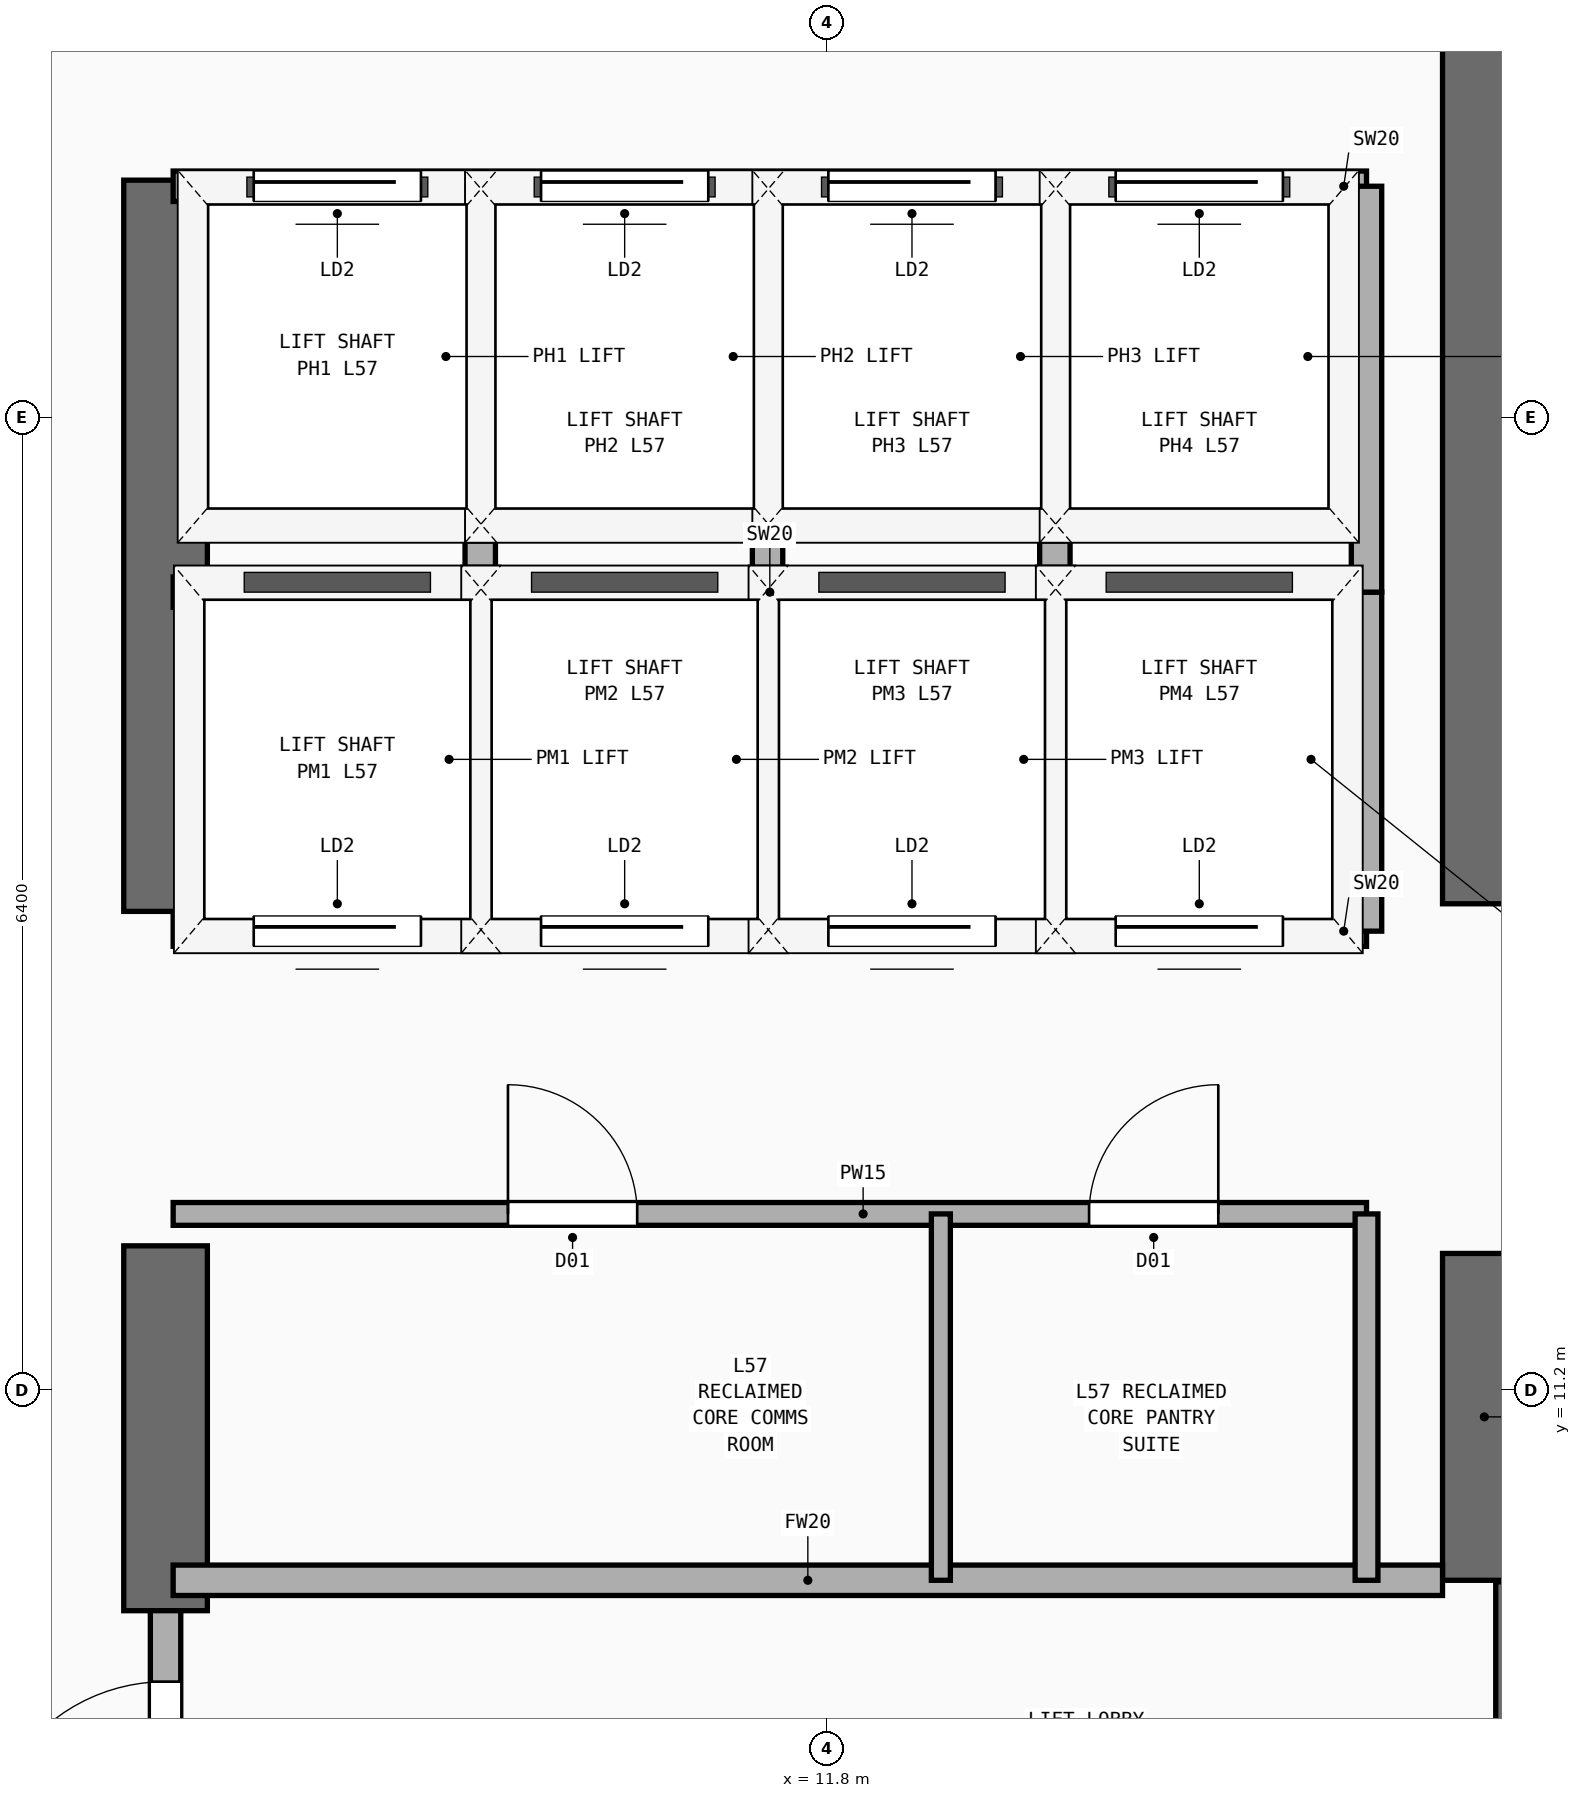
"""IFC4 building model, lengths in metres.
Left out: names, types, materials, properties, quantities, classifications, styles, units other than length and angle.
Written with IfcOpenShell. Run it as: python <this file> out.ifc"""

import sys

from ifc_helpers import new_model, si_unit, direction, frame, frame_2d, origin, place, context, subcontext, project, spatial, rectangle, extrude, element, fill, save


model = new_model("IFC4")
c1 = context("Model", 3, precision=1e-05, world=origin(), true_north=direction((0.0, 1.0)))
c2 = subcontext(c1, "Body", "Model", "MODEL_VIEW")
j1 = project(units=[si_unit("LENGTHUNIT", "METRE"), si_unit("PLANEANGLEUNIT", "RADIAN")], contexts=[c1])
p1 = place(None, origin())
s1 = spatial("IfcSite", under=j1, at=p1, CompositionType="ELEMENT")
p2 = place(p1, origin())
s2 = spatial("IfcBuilding", under=s1, at=p2, CompositionType="ELEMENT")
p3 = place(p2, frame((0.0, 0.0, 223.5)))
s3 = spatial("IfcBuildingStorey", under=s2, at=p3, CompositionType="ELEMENT", Elevation=223.5)
p4 = place(p3, frame((7.45, 9.75, 0.0), z_axis=(0.0, 0.0, 1.0), x_axis=(0.0, 1.0, 0.0)))
e1 = element("IfcWall", 1, at=p4, inside=s3, PredefinedType="SHEAR", context=c2, shape_type="SweptSolid", body=[
    extrude(rectangle(XDim=2.4, YDim=0.55, at=frame_2d((1.2, 0.0))), origin(), (0.0, 0.0, 1.0), 3.56),
])
p5 = place(p3, frame((7.45, 14.35, 0.0), z_axis=(0.0, 0.0, 1.0), x_axis=(0.0, 1.0, 0.0)))
e2 = element("IfcWall", 2, at=p5, inside=s3, PredefinedType="SHEAR", context=c2, shape_type="SweptSolid", body=[
    extrude(rectangle(XDim=4.81, YDim=0.55, at=frame_2d((2.405, 0.0))), origin(), (0.0, 0.0, 1.0), 3.56),
])
p6 = place(p3, frame((16.125, 9.95, 0.0), z_axis=(0.0, 0.0, 1.0), x_axis=(0.0, 1.0, 0.0)))
e3 = element("IfcWall", 3, at=p6, inside=s3, PredefinedType="SHEAR", context=c2, shape_type="SweptSolid", body=[
    extrude(rectangle(XDim=2.15, YDim=0.55, at=frame_2d((1.075, 0.0))), origin(), (0.0, 0.0, 1.0), 3.56),
])
p7 = place(p3, frame((16.125, 14.4, 0.0), z_axis=(0.0, 0.0, 1.0), x_axis=(0.0, 1.0, 0.0)))
e4 = element("IfcWall", 4, at=p7, inside=s3, PredefinedType="SHEAR", context=c2, shape_type="SweptSolid", body=[
    extrude(rectangle(XDim=9.1, YDim=0.55, at=frame_2d((4.55, 0.0))), origin(), (0.0, 0.0, 1.0), 3.56),
])
p8 = place(p3, frame((16.3, 7.36, 0.0), z_axis=(0.0, 0.0, 1.0), x_axis=(0.0, 1.0, 0.0)))
e5 = element("IfcWall", 5, at=p8, inside=s3, PredefinedType="SHEAR", context=c2, shape_type="SweptSolid", body=[
    extrude(rectangle(XDim=2.58, YDim=0.2, at=frame_2d((1.29, 0.0))), origin(), (0.0, 0.0, 1.0), 3.56),
])
p9 = place(p3, frame((7.5, 9.95, 0.0), z_axis=(0.0, 0.0, 1.0), x_axis=(1.0, 0.0, 0.0)))
e6 = element("IfcWall", 6, at=p9, inside=s3, PredefinedType="PARTITIONING", context=c2, shape_type="SweptSolid", body=[
    extrude(rectangle(XDim=8.35, YDim=0.2, at=frame_2d((4.175, 0.0))), origin(), (0.0, 0.0, 1.0), 3.56),
])
p10 = place(p3, frame((7.45, 7.45, 0.0), z_axis=(0.0, 0.0, 1.0), x_axis=(0.0, 1.0, 0.0)))
e7 = element("IfcWall", 7, at=p10, inside=s3, PredefinedType="PARTITIONING", context=c2, shape_type="SweptSolid", body=[
    extrude(rectangle(XDim=2.3, YDim=0.2, at=frame_2d((1.15, 0.0))), origin(), (0.0, 0.0, 1.0), 2.54),
])
p11 = place(p10, frame((0.633, 0.0, 0.0)))
e8 = element("IfcOpeningElement", 8, at=p11, cuts=e7, PredefinedType="OPENING", context=c2, shape_type="SweptSolid", body=[
    extrude(rectangle(XDim=1.2, YDim=2.25, at=frame_2d((0.6, 1.125))), frame((0.0, 0.11, 0.0), z_axis=(0.0, -1.0, 0.0), x_axis=(1.0, 0.0, 0.0)), (0.0, 0.0, 1.0), 0.22),
])
p12 = place(p3, frame((7.5, 12.36, 0.0), z_axis=(0.0, 0.0, 1.0), x_axis=(1.0, 0.0, 0.0)))
e9 = element("IfcWall", 9, at=p12, inside=s3, PredefinedType="PARTITIONING", context=c2, shape_type="SweptSolid", body=[
    extrude(rectangle(XDim=7.85, YDim=0.15, at=frame_2d((3.925, 0.0))), origin(), (0.0, 0.0, 1.0), 3.56),
])
p13 = place(p12, frame((2.202, 0.0, 0.0)))
e10 = element("IfcOpeningElement", 10, at=p13, cuts=e9, PredefinedType="OPENING", context=c2, shape_type="SweptSolid", body=[
    extrude(rectangle(XDim=0.85, YDim=2.15, at=frame_2d((0.425, 1.075))), frame((0.0, 0.085, 0.0), z_axis=(0.0, -1.0, 0.0), x_axis=(1.0, 0.0, 0.0)), (0.0, 0.0, 1.0), 0.17),
])
p14 = place(p12, frame((6.025, 0.0, 0.0)))
e11 = element("IfcOpeningElement", 11, at=p14, cuts=e9, PredefinedType="OPENING", context=c2, shape_type="SweptSolid", body=[
    extrude(rectangle(XDim=0.85, YDim=2.15, at=frame_2d((0.425, 1.075))), frame((0.0, 0.085, 0.0), z_axis=(0.0, -1.0, 0.0), x_axis=(1.0, 0.0, 0.0)), (0.0, 0.0, 1.0), 0.17),
])
p15 = place(p3, frame((15.35, 9.95, 0.0), z_axis=(0.0, 0.0, 1.0), x_axis=(0.0, 1.0, 0.0)))
e12 = element("IfcWall", 12, at=p15, inside=s3, PredefinedType="PARTITIONING", context=c2, shape_type="SweptSolid", body=[
    extrude(rectangle(XDim=2.41, YDim=0.15, at=frame_2d((1.205, 0.0))), origin(), (0.0, 0.0, 1.0), 3.56),
])
p16 = place(p3, frame((12.55, 9.95, 0.0), z_axis=(0.0, 0.0, 1.0), x_axis=(0.0, 1.0, 0.0)))
e13 = element("IfcWall", 13, at=p16, inside=s3, PredefinedType="PARTITIONING", context=c2, shape_type="SweptSolid", body=[
    extrude(rectangle(XDim=2.41, YDim=0.125, at=frame_2d((1.205, 0.0))), origin(), (0.0, 0.0, 1.0), 3.56),
])
p17 = place(p3, frame((7.5, 14.22, 0.0), z_axis=(0.0, 0.0, 1.0), x_axis=(1.0, 0.0, 0.0)))
e14 = element("IfcWall", 14, at=p17, inside=s3, PredefinedType="PARTITIONING", context=c2, shape_type="SweptSolid", body=[
    extrude(rectangle(XDim=7.85, YDim=0.2, at=frame_2d((3.925, 0.0))), origin(), (0.0, 0.0, 1.0), 3.56),
])
p18 = place(p17, frame((0.53, 0.0, 0.0)))
e15 = element("IfcOpeningElement", 15, at=p18, cuts=e14, PredefinedType="OPENING", context=c2, shape_type="SweptSolid", body=[
    extrude(rectangle(XDim=1.1, YDim=2.2, at=frame_2d((0.55, 1.1))), frame((0.0, 0.11, 0.0), z_axis=(0.0, -1.0, 0.0), x_axis=(1.0, 0.0, 0.0)), (0.0, 0.0, 1.0), 0.22),
])
p19 = place(p17, frame((2.42, 0.0, 0.0)))
e16 = element("IfcOpeningElement", 16, at=p19, cuts=e14, PredefinedType="OPENING", context=c2, shape_type="SweptSolid", body=[
    extrude(rectangle(XDim=1.1, YDim=2.2, at=frame_2d((0.55, 1.1))), frame((0.0, 0.11, 0.0), z_axis=(0.0, -1.0, 0.0), x_axis=(1.0, 0.0, 0.0)), (0.0, 0.0, 1.0), 0.22),
])
p20 = place(p17, frame((4.31, 0.0, 0.0)))
e17 = element("IfcOpeningElement", 17, at=p20, cuts=e14, PredefinedType="OPENING", context=c2, shape_type="SweptSolid", body=[
    extrude(rectangle(XDim=1.1, YDim=2.2, at=frame_2d((0.55, 1.1))), frame((0.0, 0.11, 0.0), z_axis=(0.0, -1.0, 0.0), x_axis=(1.0, 0.0, 0.0)), (0.0, 0.0, 1.0), 0.22),
])
p21 = place(p17, frame((6.2, 0.0, 0.0)))
e18 = element("IfcOpeningElement", 18, at=p21, cuts=e14, PredefinedType="OPENING", context=c2, shape_type="SweptSolid", body=[
    extrude(rectangle(XDim=1.1, YDim=2.2, at=frame_2d((0.55, 1.1))), frame((0.0, 0.11, 0.0), z_axis=(0.0, -1.0, 0.0), x_axis=(1.0, 0.0, 0.0)), (0.0, 0.0, 1.0), 0.22),
])
p22 = place(p3, frame((7.5, 16.45, 0.0), z_axis=(0.0, 0.0, 1.0), x_axis=(1.0, 0.0, 0.0)))
e19 = element("IfcWall", 19, at=p22, inside=s3, PredefinedType="PARTITIONING", context=c2, shape_type="SweptSolid", body=[
    extrude(rectangle(XDim=7.85, YDim=0.2, at=frame_2d((3.925, 0.0))), origin(), (0.0, 0.0, 1.0), 3.56),
])
for number, where, z_axis, x_axis in (
    (20, (15.35, 14.22, 0.0), (0.0, 0.0, 1.0), (0.0, 1.0, 0.0)),
    (21, (9.52, 14.22, 0.0), (0.0, 0.0, 1.0), (0.0, 1.0, 0.0)),
    (22, (11.41, 14.22, 0.0), (0.0, 0.0, 1.0), (0.0, 1.0, 0.0)),
    (23, (13.3, 14.22, 0.0), (0.0, 0.0, 1.0), (0.0, 1.0, 0.0)),
):
    element("IfcWall", number, at=place(p3, frame(where, z_axis=z_axis, x_axis=x_axis)), inside=s3, PredefinedType="PARTITIONING", context=c2, shape_type="SweptSolid", body=[
        extrude(rectangle(XDim=2.23, YDim=0.2, at=frame_2d((1.115, 0.0))), origin(), (0.0, 0.0, 1.0), 3.56),
    ])
p23 = place(p3, frame((7.5, 19.12, 0.0), z_axis=(0.0, 0.0, 1.0), x_axis=(1.0, 0.0, 0.0)))
e24 = element("IfcWall", 24, at=p23, inside=s3, PredefinedType="PARTITIONING", context=c2, shape_type="SweptSolid", body=[
    extrude(rectangle(XDim=7.85, YDim=0.2, at=frame_2d((3.925, 0.0))), origin(), (0.0, 0.0, 1.0), 3.56),
])
p24 = place(p23, frame((0.53, 0.0, 0.0)))
e25 = element("IfcOpeningElement", 25, at=p24, cuts=e24, PredefinedType="OPENING", context=c2, shape_type="SweptSolid", body=[
    extrude(rectangle(XDim=1.1, YDim=2.2, at=frame_2d((0.55, 1.1))), frame((0.0, 0.11, 0.0), z_axis=(0.0, -1.0, 0.0), x_axis=(1.0, 0.0, 0.0)), (0.0, 0.0, 1.0), 0.22),
])
p25 = place(p23, frame((2.42, 0.0, 0.0)))
e26 = element("IfcOpeningElement", 26, at=p25, cuts=e24, PredefinedType="OPENING", context=c2, shape_type="SweptSolid", body=[
    extrude(rectangle(XDim=1.1, YDim=2.2, at=frame_2d((0.55, 1.1))), frame((0.0, 0.11, 0.0), z_axis=(0.0, -1.0, 0.0), x_axis=(1.0, 0.0, 0.0)), (0.0, 0.0, 1.0), 0.22),
])
p26 = place(p23, frame((4.31, 0.0, 0.0)))
e27 = element("IfcOpeningElement", 27, at=p26, cuts=e24, PredefinedType="OPENING", context=c2, shape_type="SweptSolid", body=[
    extrude(rectangle(XDim=1.1, YDim=2.2, at=frame_2d((0.55, 1.1))), frame((0.0, 0.11, 0.0), z_axis=(0.0, -1.0, 0.0), x_axis=(1.0, 0.0, 0.0)), (0.0, 0.0, 1.0), 0.22),
])
p27 = place(p23, frame((6.2, 0.0, 0.0)))
e28 = element("IfcOpeningElement", 28, at=p27, cuts=e24, PredefinedType="OPENING", context=c2, shape_type="SweptSolid", body=[
    extrude(rectangle(XDim=1.1, YDim=2.2, at=frame_2d((0.55, 1.1))), frame((0.0, 0.11, 0.0), z_axis=(0.0, -1.0, 0.0), x_axis=(1.0, 0.0, 0.0)), (0.0, 0.0, 1.0), 0.22),
])
for number, where, z_axis, x_axis in (
    (29, (15.35, 16.45, 0.0), (0.0, 0.0, 1.0), (0.0, 1.0, 0.0)),
    (30, (9.52, 16.45, 0.0), (0.0, 0.0, 1.0), (0.0, 1.0, 0.0)),
    (31, (11.41, 16.45, 0.0), (0.0, 0.0, 1.0), (0.0, 1.0, 0.0)),
    (32, (13.3, 16.45, 0.0), (0.0, 0.0, 1.0), (0.0, 1.0, 0.0)),
):
    element("IfcWall", number, at=place(p3, frame(where, z_axis=z_axis, x_axis=x_axis)), inside=s3, PredefinedType="PARTITIONING", context=c2, shape_type="SweptSolid", body=[
        extrude(rectangle(XDim=2.67, YDim=0.2, at=frame_2d((1.335, 0.0))), origin(), (0.0, 0.0, 1.0), 3.56),
    ])
p28 = place(p11, frame((1.2, 0.0, 0.0), z_axis=(0.0, 0.0, 1.0), x_axis=(-1.0, 0.0, 0.0)))
e33 = element("IfcDoor", 33, at=p28, inside=s3, OperationType="SINGLE_SWING_RIGHT", PredefinedType="DOOR", context=c2, shape_type="SweptSolid", body=[
    extrude(rectangle(XDim=1.2, YDim=2.25, at=frame_2d((0.6, 1.125))), frame((0.0, 0.025, 0.0), z_axis=(0.0, -1.0, 0.0), x_axis=(1.0, 0.0, 0.0)), (0.0, 0.0, 1.0), 0.05),
])
fill(e8, e33)
p29 = place(p13, origin())
e34 = element("IfcDoor", 34, at=p29, inside=s3, OperationType="SINGLE_SWING_LEFT", PredefinedType="DOOR", context=c2, shape_type="SweptSolid", body=[
    extrude(rectangle(XDim=0.85, YDim=2.15, at=frame_2d((0.425, 1.075))), frame((0.0, 0.025, 0.0), z_axis=(0.0, -1.0, 0.0), x_axis=(1.0, 0.0, 0.0)), (0.0, 0.0, 1.0), 0.05),
])
fill(e10, e34)
p30 = place(p14, origin())
e35 = element("IfcDoor", 35, at=p30, inside=s3, OperationType="SINGLE_SWING_RIGHT", PredefinedType="DOOR", context=c2, shape_type="SweptSolid", body=[
    extrude(rectangle(XDim=0.85, YDim=2.15, at=frame_2d((0.425, 1.075))), frame((0.0, 0.025, 0.0), z_axis=(0.0, -1.0, 0.0), x_axis=(1.0, 0.0, 0.0)), (0.0, 0.0, 1.0), 0.05),
])
fill(e11, e35)
p31 = place(p18, frame((1.1, 0.0, 0.0), z_axis=(0.0, 0.0, 1.0), x_axis=(-1.0, 0.0, 0.0)))
e36 = element("IfcDoor", 36, at=p31, inside=s3, OperationType="SLIDING_TO_LEFT", PredefinedType="DOOR", context=c2, shape_type="SweptSolid", body=[
    extrude(rectangle(XDim=1.1, YDim=2.2, at=frame_2d((0.55, 1.1))), frame((0.0, 0.025, 0.0), z_axis=(0.0, -1.0, 0.0), x_axis=(1.0, 0.0, 0.0)), (0.0, 0.0, 1.0), 0.05),
])
fill(e15, e36)
p32 = place(p19, frame((1.1, 0.0, 0.0), z_axis=(0.0, 0.0, 1.0), x_axis=(-1.0, 0.0, 0.0)))
e37 = element("IfcDoor", 37, at=p32, inside=s3, OperationType="SLIDING_TO_LEFT", PredefinedType="DOOR", context=c2, shape_type="SweptSolid", body=[
    extrude(rectangle(XDim=1.1, YDim=2.2, at=frame_2d((0.55, 1.1))), frame((0.0, 0.025, 0.0), z_axis=(0.0, -1.0, 0.0), x_axis=(1.0, 0.0, 0.0)), (0.0, 0.0, 1.0), 0.05),
])
fill(e16, e37)
p33 = place(p20, frame((1.1, 0.0, 0.0), z_axis=(0.0, 0.0, 1.0), x_axis=(-1.0, 0.0, 0.0)))
e38 = element("IfcDoor", 38, at=p33, inside=s3, OperationType="SLIDING_TO_LEFT", PredefinedType="DOOR", context=c2, shape_type="SweptSolid", body=[
    extrude(rectangle(XDim=1.1, YDim=2.2, at=frame_2d((0.55, 1.1))), frame((0.0, 0.025, 0.0), z_axis=(0.0, -1.0, 0.0), x_axis=(1.0, 0.0, 0.0)), (0.0, 0.0, 1.0), 0.05),
])
fill(e17, e38)
p34 = place(p21, frame((1.1, 0.0, 0.0), z_axis=(0.0, 0.0, 1.0), x_axis=(-1.0, 0.0, 0.0)))
e39 = element("IfcDoor", 39, at=p34, inside=s3, OperationType="SLIDING_TO_LEFT", PredefinedType="DOOR", context=c2, shape_type="SweptSolid", body=[
    extrude(rectangle(XDim=1.1, YDim=2.2, at=frame_2d((0.55, 1.1))), frame((0.0, 0.025, 0.0), z_axis=(0.0, -1.0, 0.0), x_axis=(1.0, 0.0, 0.0)), (0.0, 0.0, 1.0), 0.05),
])
fill(e18, e39)
p35 = place(p24, origin())
e40 = element("IfcDoor", 40, at=p35, inside=s3, OperationType="SLIDING_TO_LEFT", PredefinedType="DOOR", context=c2, shape_type="SweptSolid", body=[
    extrude(rectangle(XDim=1.1, YDim=2.2, at=frame_2d((0.55, 1.1))), frame((0.0, 0.025, 0.0), z_axis=(0.0, -1.0, 0.0), x_axis=(1.0, 0.0, 0.0)), (0.0, 0.0, 1.0), 0.05),
])
fill(e25, e40)
p36 = place(p25, origin())
e41 = element("IfcDoor", 41, at=p36, inside=s3, OperationType="SLIDING_TO_LEFT", PredefinedType="DOOR", context=c2, shape_type="SweptSolid", body=[
    extrude(rectangle(XDim=1.1, YDim=2.2, at=frame_2d((0.55, 1.1))), frame((0.0, 0.025, 0.0), z_axis=(0.0, -1.0, 0.0), x_axis=(1.0, 0.0, 0.0)), (0.0, 0.0, 1.0), 0.05),
])
fill(e26, e41)
p37 = place(p26, origin())
e42 = element("IfcDoor", 42, at=p37, inside=s3, OperationType="SLIDING_TO_LEFT", PredefinedType="DOOR", context=c2, shape_type="SweptSolid", body=[
    extrude(rectangle(XDim=1.1, YDim=2.2, at=frame_2d((0.55, 1.1))), frame((0.0, 0.025, 0.0), z_axis=(0.0, -1.0, 0.0), x_axis=(1.0, 0.0, 0.0)), (0.0, 0.0, 1.0), 0.05),
])
fill(e27, e42)
p38 = place(p27, origin())
e43 = element("IfcDoor", 43, at=p38, inside=s3, OperationType="SLIDING_TO_LEFT", PredefinedType="DOOR", context=c2, shape_type="SweptSolid", body=[
    extrude(rectangle(XDim=1.1, YDim=2.2, at=frame_2d((0.55, 1.1))), frame((0.0, 0.025, 0.0), z_axis=(0.0, -1.0, 0.0), x_axis=(1.0, 0.0, 0.0)), (0.0, 0.0, 1.0), 0.05),
])
fill(e28, e43)
save(model, sys.argv[1])
